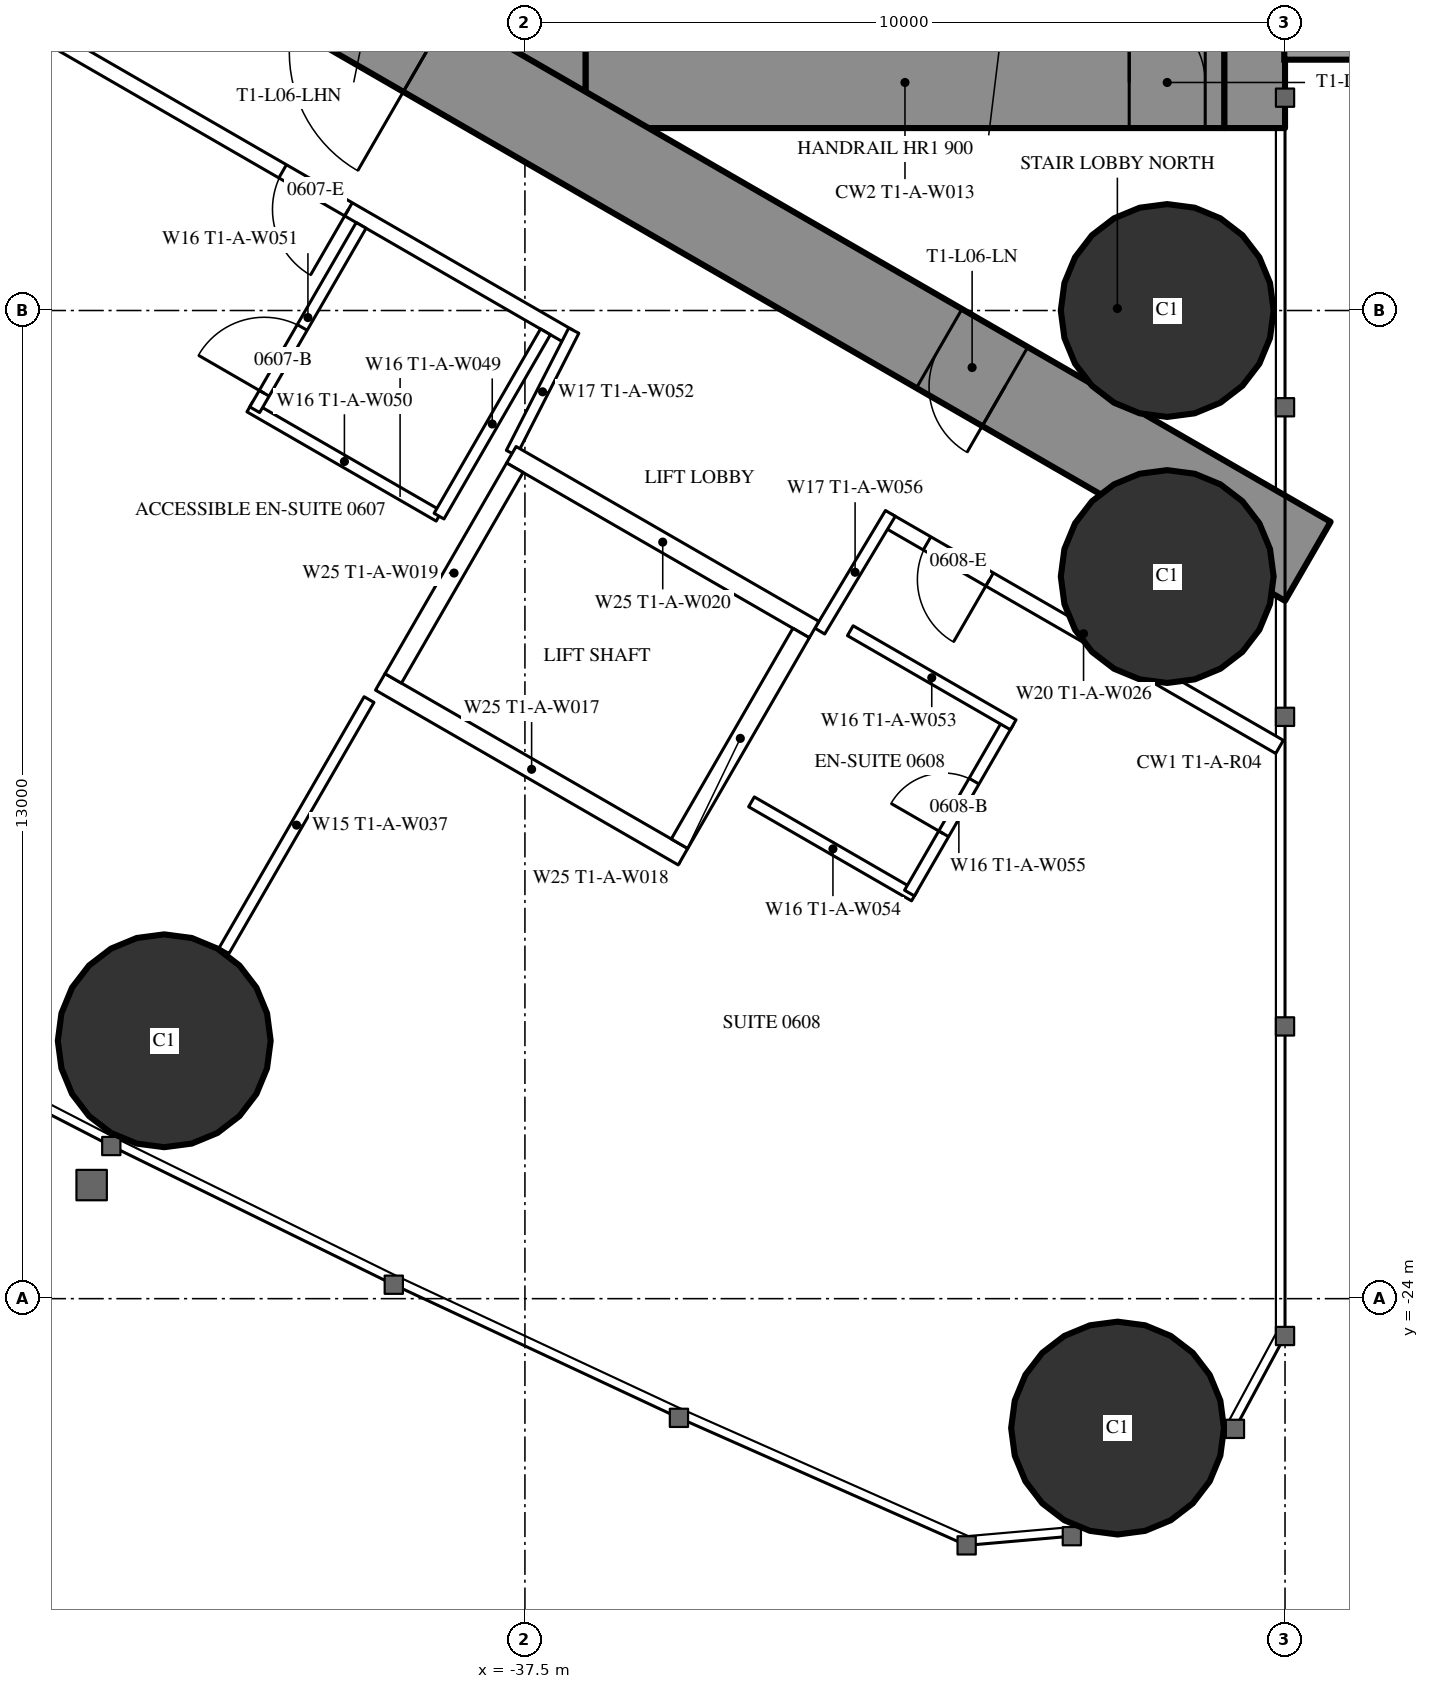
"""IFC4 building model, lengths in metres.
Left out: names, types, materials, properties, quantities, classifications, styles, units other than length and angle.
Written with IfcOpenShell. Run it as: python <this file> out.ifc"""

import sys

from ifc_helpers import new_model, si_unit, direction, frame, frame_2d, origin, origin_2d, place, context, subcontext, project, spatial, rectangle, hollow_circle, extrude, element, fill, save


model = new_model("IFC4")
c1 = context("Model", 3, precision=1e-05, world=origin(), true_north=direction((0.0, 1.0)))
c2 = subcontext(c1, "Body", "Model", "MODEL_VIEW")
j1 = project(units=[si_unit("LENGTHUNIT", "METRE"), si_unit("PLANEANGLEUNIT", "RADIAN")], contexts=[c1])
p1 = place(None, origin())
s1 = spatial("IfcSite", under=j1, at=p1, CompositionType="ELEMENT")
p2 = place(p1, origin())
s2 = spatial("IfcBuilding", under=s1, at=p2, CompositionType="ELEMENT")
p3 = place(p2, frame((0.0, 0.0, 28.5)))
s3 = spatial("IfcBuildingStorey", under=s2, at=p3, CompositionType="ELEMENT", Elevation=28.5)
for number, where, z_axis, x_axis in (
    (1, (-29.703, -25.703, 0.0), (0.0, 0.0, 1.0), (1.0, 0.0, 0.0)),
    (2, (-29.05, -11.0, 0.0), (0.0, 0.0, 1.0), (1.0, 0.0, 0.0)),
    (3, (-29.05, -14.5, 0.0), (0.0, 0.0, 1.0), (1.0, 0.0, 0.0)),
    (4, (-42.245, -20.607, 0.0), (0.0, 0.0, 1.0), (1.0, 0.0, 0.0)),
):
    element("IfcColumn", number, at=place(p3, frame(where, z_axis=z_axis, x_axis=x_axis)), inside=s3, PredefinedType="COLUMN", context=c2, shape_type="SweptSolid", body=[
        extrude(hollow_circle(Radius=1.4, WallThickness=0.12, at=origin_2d()), origin(), (0.0, 0.0, 1.0), 3.5),
    ])
p4 = place(p3, frame((-27.9, 8.6, 0.0), z_axis=(0.0, 0.0, 1.0), x_axis=(0.0, -1.0, 0.0)))
e5 = element("IfcWall", 5, at=p4, inside=s3, PredefinedType="SHEAR", context=c2, shape_type="SweptSolid", body=[
    extrude(rectangle(XDim=17.2, YDim=0.8, at=frame_2d((8.6, 0.0))), origin(), (0.0, 0.0, 1.0), 3.5),
])
p5 = place(p4, frame((2.45, 0.0, 0.6)))
e6 = element("IfcOpeningElement", 6, at=p5, cuts=e5, PredefinedType="OPENING", context=c2, shape_type="SweptSolid", body=[
    extrude(rectangle(XDim=0.6, YDim=2.1, at=frame_2d((0.3, 1.05))), frame((0.0, 0.41, 0.0), z_axis=(0.0, -1.0, 0.0), x_axis=(1.0, 0.0, 0.0)), (0.0, 0.0, 1.0), 0.82),
])
p6 = place(p4, frame((14.15, 0.0, 0.6)))
e7 = element("IfcOpeningElement", 7, at=p6, cuts=e5, PredefinedType="OPENING", context=c2, shape_type="SweptSolid", body=[
    extrude(rectangle(XDim=0.6, YDim=2.1, at=frame_2d((0.3, 1.05))), frame((0.0, 0.41, 0.0), z_axis=(0.0, -1.0, 0.0), x_axis=(1.0, 0.0, 0.0)), (0.0, 0.0, 1.0), 0.82),
])
p7 = place(p3, frame((-37.3, 8.6, 0.0), z_axis=(0.0, 0.0, 1.0), x_axis=(0.0, -1.0, 0.0)))
e8 = element("IfcWall", 8, at=p7, inside=s3, PredefinedType="SHEAR", context=c2, shape_type="SweptSolid", body=[
    extrude(rectangle(XDim=17.2, YDim=1.2, at=frame_2d((8.6, 0.0))), origin(), (0.0, 0.0, 1.0), 3.5),
])
p8 = place(p7, frame((7.7, 0.0, 0.0)))
e9 = element("IfcOpeningElement", 9, at=p8, cuts=e8, PredefinedType="OPENING", context=c2, shape_type="SweptSolid", body=[
    extrude(rectangle(XDim=1.8, YDim=2.2, at=frame_2d((0.9, 1.1))), frame((0.0, 0.61, 0.0), z_axis=(0.0, -1.0, 0.0), x_axis=(1.0, 0.0, 0.0)), (0.0, 0.0, 1.0), 1.22),
])
p9 = place(p3, frame((-28.3, -8.0, 0.0), z_axis=(0.0, 0.0, 1.0), x_axis=(-1.0, 0.0, 0.0)))
e10 = element("IfcWall", 10, at=p9, inside=s3, PredefinedType="SHEAR", context=c2, shape_type="SweptSolid", body=[
    extrude(rectangle(XDim=8.4, YDim=1.2, at=frame_2d((4.2, 0.0))), origin(), (0.0, 0.0, 1.0), 3.5),
])
p10 = place(p9, frame((0.25, 0.0, 0.0)))
e11 = element("IfcOpeningElement", 11, at=p10, cuts=e10, PredefinedType="OPENING", context=c2, shape_type="SweptSolid", body=[
    extrude(rectangle(XDim=1.0, YDim=2.2, at=frame_2d((0.5, 1.1))), frame((0.0, 0.61, 0.0), z_axis=(0.0, -1.0, 0.0), x_axis=(1.0, 0.0, 0.0)), (0.0, 0.0, 1.0), 1.22),
])
p11 = place(p3, frame((-27.2, -14.3, 0.0), z_axis=(0.0, 0.0, 1.0), x_axis=(-0.866024021859, 0.500002393557, 0.0)))
e12 = element("IfcWall", 12, at=p11, inside=s3, PredefinedType="SHEAR", context=c2, shape_type="SweptSolid", body=[
    extrude(rectangle(XDim=27.907, YDim=1.2, at=frame_2d((13.954, 0.0))), origin(), (0.0, 0.0, 1.0), 3.5),
])
p12 = place(p11, frame((4.6, 0.0, 0.0)))
e13 = element("IfcOpeningElement", 13, at=p12, cuts=e12, PredefinedType="OPENING", context=c2, shape_type="SweptSolid", body=[
    extrude(rectangle(XDim=1.0, YDim=2.2, at=frame_2d((0.5, 1.1))), frame((0.0, 0.61, 0.0), z_axis=(0.0, -1.0, 0.0), x_axis=(1.0, 0.0, 0.0)), (0.0, 0.0, 1.0), 1.22),
])
p13 = place(p11, frame((13.395, 0.0, 0.0)))
e14 = element("IfcOpeningElement", 14, at=p13, cuts=e12, PredefinedType="OPENING", context=c2, shape_type="SweptSolid", body=[
    extrude(rectangle(XDim=1.8, YDim=2.2, at=frame_2d((0.9, 1.1))), frame((0.0, 0.61, 0.0), z_axis=(0.0, -1.0, 0.0), x_axis=(1.0, 0.0, 0.0)), (0.0, 0.0, 1.0), 1.22),
])
p14 = place(p3, frame((-39.551, -16.118, 0.0), z_axis=(0.0, 0.0, 1.0), x_axis=(-0.499986503906, -0.866033195618, 0.0)))
e15 = element("IfcWall", 15, at=p14, inside=s3, PredefinedType="PARTITIONING", context=c2, shape_type="SweptSolid", body=[
    extrude(rectangle(XDim=3.815, YDim=0.15, at=frame_2d((1.907, 0.0))), origin(), (0.0, 0.0, 1.0), 3.25),
])
p15 = place(p3, frame((-27.572, -16.741, 0.0), z_axis=(0.0, 0.0, 1.0), x_axis=(-0.866024464444, 0.500001626982, 0.0)))
e16 = element("IfcWall", 16, at=p15, inside=s3, PredefinedType="PARTITIONING", context=c2, shape_type="SweptSolid", body=[
    extrude(rectangle(XDim=5.955, YDim=0.2, at=frame_2d((2.978, 0.0))), origin(), (0.0, 0.0, 1.0), 3.25),
])
p16 = place(p15, frame((4.405, 0.0, 0.0)))
e17 = element("IfcOpeningElement", 17, at=p16, cuts=e16, PredefinedType="OPENING", context=c2, shape_type="SweptSolid", body=[
    extrude(rectangle(XDim=0.95, YDim=2.2, at=frame_2d((0.475, 1.1))), frame((0.0, 0.11, 0.0), z_axis=(0.0, -1.0, 0.0), x_axis=(1.0, 0.0, 0.0)), (0.0, 0.0, 1.0), 0.22),
])
p17 = place(p3, frame((-36.92, -11.344, 0.0), z_axis=(0.0, 0.0, 1.0), x_axis=(-0.866028313256, 0.499994960614, 0.0)))
e18 = element("IfcWall", 18, at=p17, inside=s3, PredefinedType="PARTITIONING", context=c2, shape_type="SweptSolid", body=[
    extrude(rectangle(XDim=22.568, YDim=0.2, at=frame_2d((11.284, 0.0))), origin(), (0.0, 0.0, 1.0), 3.25),
])
p18 = place(p17, frame((12.68, 0.0, 0.0)))
e19 = element("IfcOpeningElement", 19, at=p18, cuts=e18, PredefinedType="OPENING", context=c2, shape_type="SweptSolid", body=[
    extrude(rectangle(XDim=0.95, YDim=2.2, at=frame_2d((0.475, 1.1))), frame((0.0, 0.11, 0.0), z_axis=(0.0, -1.0, 0.0), x_axis=(1.0, 0.0, 0.0)), (0.0, 0.0, 1.0), 0.22),
])
p19 = place(p17, frame((3.35, 0.0, 0.0)))
e20 = element("IfcOpeningElement", 20, at=p19, cuts=e18, PredefinedType="OPENING", context=c2, shape_type="SweptSolid", body=[
    extrude(rectangle(XDim=1.0, YDim=2.2, at=frame_2d((0.5, 1.1))), frame((0.0, 0.11, 0.0), z_axis=(0.0, -1.0, 0.0), x_axis=(1.0, 0.0, 0.0)), (0.0, 0.0, 1.0), 0.22),
])
p20 = place(p3, frame((-36.857, -11.265, 0.0), z_axis=(0.0, 0.0, 1.0), x_axis=(-0.454225294761, -0.890886851176, 0.0)))
e21 = element("IfcWall", 21, at=p20, inside=s3, PredefinedType="PARTITIONING", context=c2, shape_type="SweptSolid", body=[
    extrude(rectangle(XDim=1.807, YDim=0.15, at=frame_2d((0.904, 0.0))), origin(), (0.0, 0.0, 1.0), 3.25),
])
p21 = place(p3, frame((-33.621, -15.218, 0.0), z_axis=(0.0, 0.0, 1.0), x_axis=(0.514336634837, 0.857588377991, 0.0)))
e22 = element("IfcWall", 22, at=p21, inside=s3, PredefinedType="PARTITIONING", context=c2, shape_type="SweptSolid", body=[
    extrude(rectangle(XDim=1.805, YDim=0.15, at=frame_2d((0.903, 0.0))), origin(), (0.0, 0.0, 1.0), 3.25),
])
p22 = place(p3, frame((-38.63, -13.705, 0.0), z_axis=(0.0, 0.0, 1.0), x_axis=(-0.866018712932, 0.500011588718, 0.0)))
e23 = element("IfcWall", 23, at=p22, inside=s3, PredefinedType="PARTITIONING", context=c2, shape_type="SweptSolid", body=[
    extrude(rectangle(XDim=2.875, YDim=0.15, at=frame_2d((1.438, 0.0))), origin(), (0.0, 0.0, 1.0), 3.25),
])
p23 = place(p3, frame((-39.655, -9.88, 0.0), z_axis=(0.0, 0.0, 1.0), x_axis=(-0.500049511043, -0.865996816683, 0.0)))
e24 = element("IfcWall", 24, at=p23, inside=s3, PredefinedType="PARTITIONING", context=c2, shape_type="SweptSolid", body=[
    extrude(rectangle(XDim=2.8, YDim=0.15, at=frame_2d((1.4, 0.0))), origin(), (0.0, 0.0, 1.0), 3.25),
])
p24 = place(p23, frame((1.55, 0.0, 0.0)))
e25 = element("IfcOpeningElement", 25, at=p24, cuts=e24, PredefinedType="OPENING", context=c2, shape_type="SweptSolid", body=[
    extrude(rectangle(XDim=1.0, YDim=2.2, at=frame_2d((0.5, 1.1))), frame((0.0, 0.085, 0.0), z_axis=(0.0, -1.0, 0.0), x_axis=(1.0, 0.0, 0.0)), (0.0, 0.0, 1.0), 0.17),
])
p25 = place(p3, frame((-37.23, -11.281, 0.0), z_axis=(0.0, 0.0, 1.0), x_axis=(-0.500049511043, -0.865996816683, 0.0)))
e26 = element("IfcWall", 26, at=p25, inside=s3, PredefinedType="PARTITIONING", context=c2, shape_type="SweptSolid", body=[
    extrude(rectangle(XDim=2.8, YDim=0.15, at=frame_2d((1.4, 0.0))), origin(), (0.0, 0.0, 1.0), 3.25),
])
p26 = place(p3, frame((-32.376, -18.702, 0.0), z_axis=(0.0, 0.0, 1.0), x_axis=(-0.866006523861, 0.500032699561, 0.0)))
e27 = element("IfcWall", 27, at=p26, inside=s3, PredefinedType="PARTITIONING", context=c2, shape_type="SweptSolid", body=[
    extrude(rectangle(XDim=2.475, YDim=0.15, at=frame_2d((1.237, 0.0))), origin(), (0.0, 0.0, 1.0), 3.25),
])
p27 = place(p3, frame((-31.141, -16.413, 0.0), z_axis=(0.0, 0.0, 1.0), x_axis=(-0.500006934395, -0.866021400173, 0.0)))
e28 = element("IfcWall", 28, at=p27, inside=s3, PredefinedType="PARTITIONING", context=c2, shape_type="SweptSolid", body=[
    extrude(rectangle(XDim=2.6, YDim=0.15, at=frame_2d((1.3, 0.0))), origin(), (0.0, 0.0, 1.0), 3.25),
])
p28 = place(p27, frame((0.9, 0.0, 0.0)))
e29 = element("IfcOpeningElement", 29, at=p28, cuts=e28, PredefinedType="OPENING", context=c2, shape_type="SweptSolid", body=[
    extrude(rectangle(XDim=0.8, YDim=2.2, at=frame_2d((0.4, 1.1))), frame((0.0, 0.085, 0.0), z_axis=(0.0, -1.0, 0.0), x_axis=(1.0, 0.0, 0.0)), (0.0, 0.0, 1.0), 0.17),
])
p29 = place(p3, frame((-31.076, -16.45, 0.0), z_axis=(0.0, 0.0, 1.0), x_axis=(-0.866073894602, 0.499916002032, 0.0)))
e30 = element("IfcWall", 30, at=p29, inside=s3, PredefinedType="PARTITIONING", context=c2, shape_type="SweptSolid", body=[
    extrude(rectangle(XDim=2.475, YDim=0.15, at=frame_2d((1.238, 0.0))), origin(), (0.0, 0.0, 1.0), 3.25),
])
p30 = place(p3, frame((-33.696, -15.197, 0.0), z_axis=(0.0, 0.0, 1.0), x_axis=(-0.865976953817, 0.500083908417, 0.0)))
e31 = element("IfcWall", 31, at=p30, inside=s3, PredefinedType="PARTITIONING", context=c2, shape_type="SweptSolid", body=[
    extrude(rectangle(XDim=4.599, YDim=0.25, at=frame_2d((2.3, 0.0))), origin(), (0.0, 0.0, 1.0), 3.25),
])
p31 = place(p3, frame((-35.42, -18.186, 0.0), z_axis=(0.0, 0.0, 1.0), x_axis=(-0.865990227814, 0.50006092162, 0.0)))
e32 = element("IfcWall", 32, at=p31, inside=s3, PredefinedType="PARTITIONING", context=c2, shape_type="SweptSolid", body=[
    extrude(rectangle(XDim=4.6, YDim=0.25, at=frame_2d((2.3, 0.0))), origin(), (0.0, 0.0, 1.0), 3.25),
])
p32 = place(p3, frame((-33.866, -15.243, 0.0), z_axis=(0.0, 0.0, 1.0), x_axis=(-0.499929347863, -0.866066190972, 0.0)))
e33 = element("IfcWall", 33, at=p32, inside=s3, PredefinedType="PARTITIONING", context=c2, shape_type="SweptSolid", body=[
    extrude(rectangle(XDim=3.201, YDim=0.25, at=frame_2d((1.6, 0.0))), origin(), (0.0, 0.0, 1.0), 3.25),
])
p33 = place(p3, frame((-37.633, -13.068, 0.0), z_axis=(0.0, 0.0, 1.0), x_axis=(-0.499872130319, -0.866099216793, 0.0)))
e34 = element("IfcWall", 34, at=p33, inside=s3, PredefinedType="PARTITIONING", context=c2, shape_type="SweptSolid", body=[
    extrude(rectangle(XDim=3.2, YDim=0.25, at=frame_2d((1.6, 0.0))), origin(), (0.0, 0.0, 1.0), 3.25),
])
p34 = place(p24, origin())
e35 = element("IfcDoor", 35, at=p34, inside=s3, OperationType="SINGLE_SWING_RIGHT", PredefinedType="DOOR", context=c2, shape_type="SweptSolid", body=[
    extrude(rectangle(XDim=1.0, YDim=2.2, at=frame_2d((0.5, 1.1))), frame((0.0, 0.025, 0.0), z_axis=(0.0, -1.0, 0.0), x_axis=(1.0, 0.0, 0.0)), (0.0, 0.0, 1.0), 0.05),
])
fill(e25, e35)
p35 = place(p19, origin())
e36 = element("IfcDoor", 36, at=p35, inside=s3, OperationType="SINGLE_SWING_LEFT", PredefinedType="DOOR", context=c2, shape_type="SweptSolid", body=[
    extrude(rectangle(XDim=1.0, YDim=2.2, at=frame_2d((0.5, 1.1))), frame((0.0, 0.025, 0.0), z_axis=(0.0, -1.0, 0.0), x_axis=(1.0, 0.0, 0.0)), (0.0, 0.0, 1.0), 0.05),
])
fill(e20, e36)
p36 = place(p28, origin())
e37 = element("IfcDoor", 37, at=p36, inside=s3, OperationType="SINGLE_SWING_RIGHT", PredefinedType="DOOR", context=c2, shape_type="SweptSolid", body=[
    extrude(rectangle(XDim=0.8, YDim=2.2, at=frame_2d((0.4, 1.1))), frame((0.0, 0.025, 0.0), z_axis=(0.0, -1.0, 0.0), x_axis=(1.0, 0.0, 0.0)), (0.0, 0.0, 1.0), 0.05),
])
fill(e29, e37)
p37 = place(p16, origin())
e38 = element("IfcDoor", 38, at=p37, inside=s3, OperationType="SINGLE_SWING_LEFT", PredefinedType="DOOR", context=c2, shape_type="SweptSolid", body=[
    extrude(rectangle(XDim=0.95, YDim=2.2, at=frame_2d((0.475, 1.1))), frame((0.0, 0.025, 0.0), z_axis=(0.0, -1.0, 0.0), x_axis=(1.0, 0.0, 0.0)), (0.0, 0.0, 1.0), 0.05),
])
fill(e17, e38)
p38 = place(p12, origin())
e39 = element("IfcDoor", 39, at=p38, inside=s3, OperationType="SINGLE_SWING_LEFT", PredefinedType="DOOR", context=c2, shape_type="SweptSolid", body=[
    extrude(rectangle(XDim=1.0, YDim=2.2, at=frame_2d((0.5, 1.1))), frame((0.0, 0.025, 0.0), z_axis=(0.0, -1.0, 0.0), x_axis=(1.0, 0.0, 0.0)), (0.0, 0.0, 1.0), 0.05),
])
fill(e13, e39)
p39 = place(p13, origin())
e40 = element("IfcDoor", 40, at=p39, inside=s3, OperationType="DOUBLE_DOOR_SINGLE_SWING", PredefinedType="DOOR", context=c2, shape_type="SweptSolid", body=[
    extrude(rectangle(XDim=1.8, YDim=2.2, at=frame_2d((0.9, 1.1))), frame((0.0, 0.025, 0.0), z_axis=(0.0, -1.0, 0.0), x_axis=(1.0, 0.0, 0.0)), (0.0, 0.0, 1.0), 0.05),
])
fill(e14, e40)
p40 = place(p10, origin())
e41 = element("IfcDoor", 41, at=p40, inside=s3, OperationType="SINGLE_SWING_RIGHT", PredefinedType="DOOR", context=c2, shape_type="SweptSolid", body=[
    extrude(rectangle(XDim=1.0, YDim=2.2, at=frame_2d((0.5, 1.1))), frame((0.0, 0.025, 0.0), z_axis=(0.0, -1.0, 0.0), x_axis=(1.0, 0.0, 0.0)), (0.0, 0.0, 1.0), 0.05),
])
fill(e11, e41)
save(model, sys.argv[1])
